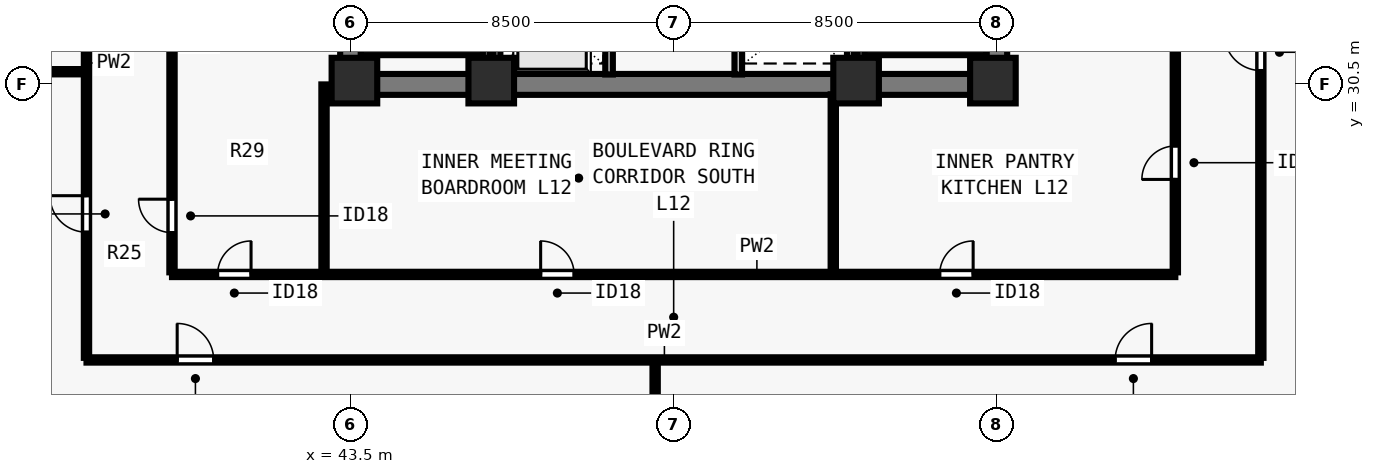
"""IFC4 building model, lengths in metres.
Left out: names, types, materials, properties, quantities, classifications, styles, units other than length and angle.
Written with IfcOpenShell. Run it as: python <this file> out.ifc"""

import sys

from ifc_helpers import new_model, si_unit, direction, frame, frame_2d, origin, origin_2d, place, context, subcontext, project, spatial, rectangle, extrude, element, fill, save


model = new_model("IFC4")
c1 = context("Model", 3, precision=1e-05, world=origin(), true_north=direction((0.0, 1.0)))
c2 = subcontext(c1, "Body", "Model", "MODEL_VIEW")
j1 = project(units=[si_unit("LENGTHUNIT", "METRE"), si_unit("PLANEANGLEUNIT", "RADIAN")], contexts=[c1])
p1 = place(None, origin())
s1 = spatial("IfcSite", under=j1, at=p1, CompositionType="ELEMENT")
p2 = place(p1, origin())
s2 = spatial("IfcBuilding", under=s1, at=p2, CompositionType="ELEMENT")
p3 = place(p2, frame((0.0, 0.0, 48.0)))
s3 = spatial("IfcBuildingStorey", under=s2, at=p3, CompositionType="ELEMENT", Elevation=48.0)
for number, where, z_axis, x_axis in (
    (1, (43.6, 30.6, 0.0), (0.0, 0.0, 1.0), (1.0, 0.0, 0.0)),
    (2, (47.2, 30.6, 0.0), (0.0, 0.0, 1.0), (1.0, 0.0, 0.0)),
    (3, (56.8, 30.6, 0.0), (0.0, 0.0, 1.0), (1.0, 0.0, 0.0)),
    (4, (60.4, 30.6, 0.0), (0.0, 0.0, 1.0), (1.0, 0.0, 0.0)),
):
    element("IfcColumn", number, at=place(p3, frame(where, z_axis=z_axis, x_axis=x_axis)), inside=s3, PredefinedType="COLUMN", context=c2, shape_type="SweptSolid", body=[
        extrude(rectangle(XDim=1.2, YDim=1.2, at=origin_2d()), origin(), (0.0, 0.0, 1.0), 3.5),
    ])
p4 = place(p3, frame((43.225, 30.5, 0.0), z_axis=(0.0, 0.0, 1.0), x_axis=(1.0, 0.0, 0.0)))
e5 = element("IfcWall", 5, at=p4, inside=s3, PredefinedType="SHEAR", context=c2, shape_type="SweptSolid", body=[
    extrude(rectangle(XDim=17.55, YDim=0.55, at=frame_2d((8.775, 0.0))), origin(), (0.0, 0.0, 1.0), 3.28),
])
for number, where, z_axis, x_axis in (
    (6, (43.5, 30.765, 0.0), (0.0, 0.0, 1.0), (0.0, 1.0, 0.0)),
    (7, (60.5, 30.765, 0.0), (0.0, 0.0, 1.0), (0.0, 1.0, 0.0)),
):
    element("IfcWall", number, at=place(p3, frame(where, z_axis=z_axis, x_axis=x_axis)), inside=s3, PredefinedType="SHEAR", context=c2, shape_type="SweptSolid", body=[
        extrude(rectangle(XDim=7.985, YDim=0.55, at=frame_2d((3.993, 0.0))), origin(), (0.0, 0.0, 1.0), 3.28),
    ])
p5 = place(p3, frame((50.3, 30.76, 0.0), z_axis=(0.0, 0.0, 1.0), x_axis=(0.0, 1.0, 0.0)))
e8 = element("IfcWall", 8, at=p5, inside=s3, PredefinedType="SOLIDWALL", context=c2, shape_type="SweptSolid", body=[
    extrude(rectangle(XDim=7.855, YDim=0.2, at=frame_2d((3.927, 0.0))), origin(), (0.0, 0.0, 1.0), 3.28),
])
p6 = place(p5, frame((0.79, 0.0, 0.0)))
e9 = element("IfcOpeningElement", 9, at=p6, cuts=e8, PredefinedType="OPENING", context=c2, shape_type="SweptSolid", body=[
    extrude(rectangle(XDim=1.1, YDim=2.2, at=frame_2d((0.55, 1.1))), frame((0.0, 0.11, 0.0), z_axis=(0.0, -1.0, 0.0), x_axis=(1.0, 0.0, 0.0)), (0.0, 0.0, 1.0), 0.22),
])
p7 = place(p5, frame((3.49, 0.0, 0.0)))
e10 = element("IfcOpeningElement", 10, at=p7, cuts=e8, PredefinedType="OPENING", context=c2, shape_type="SweptSolid", body=[
    extrude(rectangle(XDim=1.1, YDim=2.2, at=frame_2d((0.55, 1.1))), frame((0.0, 0.11, 0.0), z_axis=(0.0, -1.0, 0.0), x_axis=(1.0, 0.0, 0.0)), (0.0, 0.0, 1.0), 0.22),
])
p8 = place(p5, frame((6.19, 0.0, 0.0)))
e11 = element("IfcOpeningElement", 11, at=p8, cuts=e8, PredefinedType="OPENING", context=c2, shape_type="SweptSolid", body=[
    extrude(rectangle(XDim=1.1, YDim=2.2, at=frame_2d((0.55, 1.1))), frame((0.0, 0.11, 0.0), z_axis=(0.0, -1.0, 0.0), x_axis=(1.0, 0.0, 0.0)), (0.0, 0.0, 1.0), 0.22),
])
p9 = place(p3, frame((53.7, 30.76, 0.0), z_axis=(0.0, 0.0, 1.0), x_axis=(0.0, 1.0, 0.0)))
e12 = element("IfcWall", 12, at=p9, inside=s3, PredefinedType="SOLIDWALL", context=c2, shape_type="SweptSolid", body=[
    extrude(rectangle(XDim=7.855, YDim=0.2, at=frame_2d((3.927, 0.0))), origin(), (0.0, 0.0, 1.0), 3.28),
])
for number, where, z_axis, x_axis in (
    (13, (47.35, 30.76, 0.0), (0.0, 0.0, 1.0), (0.0, 1.0, 0.0)),
    (14, (56.65, 30.76, 0.0), (0.0, 0.0, 1.0), (0.0, 1.0, 0.0)),
):
    element("IfcWall", number, at=place(p3, frame(where, z_axis=z_axis, x_axis=x_axis)), inside=s3, PredefinedType="SOLIDWALL", context=c2, shape_type="SweptSolid", body=[
        extrude(rectangle(XDim=7.855, YDim=0.18, at=frame_2d((3.927, 0.0))), origin(), (0.0, 0.0, 1.0), 3.28),
    ])
p10 = place(p3, frame((36.55, 23.25, 0.0), z_axis=(0.0, 0.0, 1.0), x_axis=(1.0, 0.0, 0.0)))
e15 = element("IfcWall", 15, at=p10, inside=s3, PredefinedType="PARTITIONING", context=c2, shape_type="SweptSolid", body=[
    extrude(rectangle(XDim=30.9, YDim=0.14, at=frame_2d((15.45, 0.0))), origin(), (0.0, 0.0, 1.0), 3.28),
])
p11 = place(p10, frame((2.386, 0.0, 0.0)))
e16 = element("IfcOpeningElement", 16, at=p11, cuts=e15, PredefinedType="OPENING", context=c2, shape_type="SweptSolid", body=[
    extrude(rectangle(XDim=0.96, YDim=2.12, at=frame_2d((0.48, 1.06))), frame((0.0, 0.08, 0.0), z_axis=(0.0, -1.0, 0.0), x_axis=(1.0, 0.0, 0.0)), (0.0, 0.0, 1.0), 0.16),
])
p12 = place(p10, frame((27.066, 0.0, 0.0)))
e17 = element("IfcOpeningElement", 17, at=p12, cuts=e15, PredefinedType="OPENING", context=c2, shape_type="SweptSolid", body=[
    extrude(rectangle(XDim=0.96, YDim=2.12, at=frame_2d((0.48, 1.06))), frame((0.0, 0.08, 0.0), z_axis=(0.0, -1.0, 0.0), x_axis=(1.0, 0.0, 0.0)), (0.0, 0.0, 1.0), 0.16),
])
p13 = place(p3, frame((36.55, 23.305, 0.0), z_axis=(0.0, 0.0, 1.0), x_axis=(0.0, 1.0, 0.0)))
e18 = element("IfcWall", 18, at=p13, inside=s3, PredefinedType="PARTITIONING", context=c2, shape_type="SweptSolid", body=[
    extrude(rectangle(XDim=31.39, YDim=0.14, at=frame_2d((15.695, 0.0))), origin(), (0.0, 0.0, 1.0), 3.28),
])
p14 = place(p13, frame((3.307, 0.0, 0.0)))
e19 = element("IfcOpeningElement", 19, at=p14, cuts=e18, PredefinedType="OPENING", context=c2, shape_type="SweptSolid", body=[
    extrude(rectangle(XDim=0.96, YDim=2.12, at=frame_2d((0.48, 1.06))), frame((0.0, 0.08, 0.0), z_axis=(0.0, -1.0, 0.0), x_axis=(1.0, 0.0, 0.0)), (0.0, 0.0, 1.0), 0.16),
])
p15 = place(p13, frame((11.25, 0.0, 0.0)))
e20 = element("IfcOpeningElement", 20, at=p15, cuts=e18, PredefinedType="OPENING", context=c2, shape_type="SweptSolid", body=[
    extrude(rectangle(XDim=0.96, YDim=2.12, at=frame_2d((0.48, 1.06))), frame((0.0, 0.08, 0.0), z_axis=(0.0, -1.0, 0.0), x_axis=(1.0, 0.0, 0.0)), (0.0, 0.0, 1.0), 0.16),
])
p16 = place(p13, frame((19.075, 0.0, 0.0)))
e21 = element("IfcOpeningElement", 21, at=p16, cuts=e18, PredefinedType="OPENING", context=c2, shape_type="SweptSolid", body=[
    extrude(rectangle(XDim=0.96, YDim=2.12, at=frame_2d((0.48, 1.06))), frame((0.0, 0.08, 0.0), z_axis=(0.0, -1.0, 0.0), x_axis=(1.0, 0.0, 0.0)), (0.0, 0.0, 1.0), 0.16),
])
p17 = place(p13, frame((26.782, 0.0, 0.0)))
e22 = element("IfcOpeningElement", 22, at=p17, cuts=e18, PredefinedType="OPENING", context=c2, shape_type="SweptSolid", body=[
    extrude(rectangle(XDim=0.96, YDim=2.12, at=frame_2d((0.48, 1.06))), frame((0.0, 0.08, 0.0), z_axis=(0.0, -1.0, 0.0), x_axis=(1.0, 0.0, 0.0)), (0.0, 0.0, 1.0), 0.16),
])
p18 = place(p3, frame((67.45, 23.305, 0.0), z_axis=(0.0, 0.0, 1.0), x_axis=(0.0, 1.0, 0.0)))
e23 = element("IfcWall", 23, at=p18, inside=s3, PredefinedType="PARTITIONING", context=c2, shape_type="SweptSolid", body=[
    extrude(rectangle(XDim=31.39, YDim=0.14, at=frame_2d((15.695, 0.0))), origin(), (0.0, 0.0, 1.0), 3.28),
])
p19 = place(p18, frame((7.561, 0.0, 0.0)))
e24 = element("IfcOpeningElement", 24, at=p19, cuts=e23, PredefinedType="OPENING", context=c2, shape_type="SweptSolid", body=[
    extrude(rectangle(XDim=0.96, YDim=2.12, at=frame_2d((0.48, 1.06))), frame((0.0, 0.08, 0.0), z_axis=(0.0, -1.0, 0.0), x_axis=(1.0, 0.0, 0.0)), (0.0, 0.0, 1.0), 0.16),
])
p20 = place(p18, frame((23.211, 0.0, 0.0)))
e25 = element("IfcOpeningElement", 25, at=p20, cuts=e23, PredefinedType="OPENING", context=c2, shape_type="SweptSolid", body=[
    extrude(rectangle(XDim=0.96, YDim=2.12, at=frame_2d((0.48, 1.06))), frame((0.0, 0.08, 0.0), z_axis=(0.0, -1.0, 0.0), x_axis=(1.0, 0.0, 0.0)), (0.0, 0.0, 1.0), 0.16),
])
p21 = place(p3, frame((38.8, 25.5, 0.0), z_axis=(0.0, 0.0, 1.0), x_axis=(1.0, 0.0, 0.0)))
e26 = element("IfcWall", 26, at=p21, inside=s3, PredefinedType="PARTITIONING", context=c2, shape_type="SweptSolid", body=[
    extrude(rectangle(XDim=26.4, YDim=0.14, at=frame_2d((13.2, 0.0))), origin(), (0.0, 0.0, 1.0), 3.28),
])
p22 = place(p21, frame((1.2, 0.0, 0.0)))
e27 = element("IfcOpeningElement", 27, at=p22, cuts=e26, PredefinedType="OPENING", context=c2, shape_type="SweptSolid", body=[
    extrude(rectangle(XDim=0.88, YDim=2.1, at=frame_2d((0.44, 1.05))), frame((0.0, 0.08, 0.0), z_axis=(0.0, -1.0, 0.0), x_axis=(1.0, 0.0, 0.0)), (0.0, 0.0, 1.0), 0.16),
])
p23 = place(p21, frame((9.7, 0.0, 0.0)))
e28 = element("IfcOpeningElement", 28, at=p23, cuts=e26, PredefinedType="OPENING", context=c2, shape_type="SweptSolid", body=[
    extrude(rectangle(XDim=0.88, YDim=2.1, at=frame_2d((0.44, 1.05))), frame((0.0, 0.08, 0.0), z_axis=(0.0, -1.0, 0.0), x_axis=(1.0, 0.0, 0.0)), (0.0, 0.0, 1.0), 0.16),
])
p24 = place(p21, frame((20.2, 0.0, 0.0)))
e29 = element("IfcOpeningElement", 29, at=p24, cuts=e26, PredefinedType="OPENING", context=c2, shape_type="SweptSolid", body=[
    extrude(rectangle(XDim=0.88, YDim=2.1, at=frame_2d((0.44, 1.05))), frame((0.0, 0.08, 0.0), z_axis=(0.0, -1.0, 0.0), x_axis=(1.0, 0.0, 0.0)), (0.0, 0.0, 1.0), 0.16),
])
p25 = place(p3, frame((38.8, 25.555, 0.0), z_axis=(0.0, 0.0, 1.0), x_axis=(0.0, 1.0, 0.0)))
e30 = element("IfcWall", 30, at=p25, inside=s3, PredefinedType="PARTITIONING", context=c2, shape_type="SweptSolid", body=[
    extrude(rectangle(XDim=13.195, YDim=0.14, at=frame_2d((6.598, 0.0))), origin(), (0.0, 0.0, 1.0), 3.28),
])
p26 = place(p25, frame((1.045, 0.0, 0.0)))
e31 = element("IfcOpeningElement", 31, at=p26, cuts=e30, PredefinedType="OPENING", context=c2, shape_type="SweptSolid", body=[
    extrude(rectangle(XDim=0.88, YDim=2.1, at=frame_2d((0.44, 1.05))), frame((0.0, 0.08, 0.0), z_axis=(0.0, -1.0, 0.0), x_axis=(1.0, 0.0, 0.0)), (0.0, 0.0, 1.0), 0.16),
])
p27 = place(p25, frame((10.245, 0.0, 0.0)))
e32 = element("IfcOpeningElement", 32, at=p27, cuts=e30, PredefinedType="OPENING", context=c2, shape_type="SweptSolid", body=[
    extrude(rectangle(XDim=0.88, YDim=2.1, at=frame_2d((0.44, 1.05))), frame((0.0, 0.08, 0.0), z_axis=(0.0, -1.0, 0.0), x_axis=(1.0, 0.0, 0.0)), (0.0, 0.0, 1.0), 0.16),
])
p28 = place(p3, frame((65.2, 25.555, 0.0), z_axis=(0.0, 0.0, 1.0), x_axis=(0.0, 1.0, 0.0)))
e33 = element("IfcWall", 33, at=p28, inside=s3, PredefinedType="PARTITIONING", context=c2, shape_type="SweptSolid", body=[
    extrude(rectangle(XDim=13.195, YDim=0.14, at=frame_2d((6.598, 0.0))), origin(), (0.0, 0.0, 1.0), 3.28),
])
p29 = place(p28, frame((2.445, 0.0, 0.0)))
e34 = element("IfcOpeningElement", 34, at=p29, cuts=e33, PredefinedType="OPENING", context=c2, shape_type="SweptSolid", body=[
    extrude(rectangle(XDim=0.88, YDim=2.1, at=frame_2d((0.44, 1.05))), frame((0.0, 0.08, 0.0), z_axis=(0.0, -1.0, 0.0), x_axis=(1.0, 0.0, 0.0)), (0.0, 0.0, 1.0), 0.16),
])
p30 = place(p3, frame((42.8, 25.555, 0.0), z_axis=(0.0, 0.0, 1.0), x_axis=(0.0, 1.0, 0.0)))
e35 = element("IfcWall", 35, at=p30, inside=s3, PredefinedType="PARTITIONING", context=c2, shape_type="SweptSolid", body=[
    extrude(rectangle(XDim=4.945, YDim=0.14, at=frame_2d((2.473, 0.0))), origin(), (0.0, 0.0, 1.0), 2.439),
])
p31 = place(p3, frame((56.2, 25.555, 0.0), z_axis=(0.0, 0.0, 1.0), x_axis=(0.0, 1.0, 0.0)))
e36 = element("IfcWall", 36, at=p31, inside=s3, PredefinedType="PARTITIONING", context=c2, shape_type="SweptSolid", body=[
    extrude(rectangle(XDim=4.685, YDim=0.14, at=frame_2d((2.343, 0.0))), origin(), (0.0, 0.0, 1.0), 2.849),
])
p32 = place(p3, frame((51.512, 13.92, 0.0), z_axis=(0.0, 0.0, 1.0), x_axis=(0.0, 1.0, 0.0)))
e37 = element("IfcWall", 37, at=p32, inside=s3, PredefinedType="PARTITIONING", context=c2, shape_type="SweptSolid", body=[
    extrude(rectangle(XDim=9.23, YDim=0.14, at=frame_2d((4.615, 0.0))), origin(), (0.0, 0.0, 1.0), 2.849),
])
p33 = place(p3, frame((26.92, 30.834, 0.0), z_axis=(0.0, 0.0, 1.0), x_axis=(1.0, 0.0, 0.0)))
e38 = element("IfcWall", 38, at=p33, inside=s3, PredefinedType="PARTITIONING", context=c2, shape_type="SweptSolid", body=[
    extrude(rectangle(XDim=9.53, YDim=0.14, at=frame_2d((4.765, 0.0))), origin(), (0.0, 0.0, 1.0), 3.28),
])
p34 = place(p3, frame((43.765, 31.36, 0.0), z_axis=(0.0, 0.0, 1.0), x_axis=(1.0, 0.0, 0.0)))
e39 = element("IfcWall", 39, at=p34, inside=s3, PredefinedType="SOLIDWALL", context=c2, shape_type="SweptSolid", body=[
    extrude(rectangle(XDim=3.23, YDim=0.18, at=frame_2d((1.615, 0.0))), origin(), (0.0, 0.0, 1.0), 3.28),
])
p35 = place(p3, frame((47.07, 38.78, 0.0), z_axis=(0.0, 0.0, 1.0), x_axis=(0.0, -1.0, 0.0)))
e40 = element("IfcWall", 40, at=p35, inside=s3, PredefinedType="SOLIDWALL", context=c2, shape_type="SweptSolid", body=[
    extrude(rectangle(XDim=8.017, YDim=0.18, at=frame_2d((4.009, 0.0))), origin(), (0.0, 0.0, 1.0), 3.28),
])
p36 = place(p3, frame((57.005, 31.36, 0.0), z_axis=(0.0, 0.0, 1.0), x_axis=(1.0, 0.0, 0.0)))
e41 = element("IfcWall", 41, at=p36, inside=s3, PredefinedType="SOLIDWALL", context=c2, shape_type="SweptSolid", body=[
    extrude(rectangle(XDim=3.23, YDim=0.18, at=frame_2d((1.615, 0.0))), origin(), (0.0, 0.0, 1.0), 3.28),
])
p37 = place(p3, frame((56.93, 38.78, 0.0), z_axis=(0.0, 0.0, 1.0), x_axis=(0.0, -1.0, 0.0)))
e42 = element("IfcWall", 42, at=p37, inside=s3, PredefinedType="SOLIDWALL", context=c2, shape_type="SweptSolid", body=[
    extrude(rectangle(XDim=8.017, YDim=0.18, at=frame_2d((4.009, 0.0))), origin(), (0.0, 0.0, 1.0), 3.28),
])
p38 = place(p22, origin())
e43 = element("IfcDoor", 43, at=p38, inside=s3, OperationType="SINGLE_SWING_RIGHT", PredefinedType="DOOR", context=c2, shape_type="SweptSolid", body=[
    extrude(rectangle(XDim=0.88, YDim=2.1, at=frame_2d((0.44, 1.05))), frame((0.0, 0.025, 0.0), z_axis=(0.0, -1.0, 0.0), x_axis=(1.0, 0.0, 0.0)), (0.0, 0.0, 1.0), 0.05),
])
fill(e27, e43)
p39 = place(p23, origin())
e44 = element("IfcDoor", 44, at=p39, inside=s3, OperationType="SINGLE_SWING_LEFT", PredefinedType="DOOR", context=c2, shape_type="SweptSolid", body=[
    extrude(rectangle(XDim=0.88, YDim=2.1, at=frame_2d((0.44, 1.05))), frame((0.0, 0.025, 0.0), z_axis=(0.0, -1.0, 0.0), x_axis=(1.0, 0.0, 0.0)), (0.0, 0.0, 1.0), 0.05),
])
fill(e28, e44)
p40 = place(p24, origin())
e45 = element("IfcDoor", 45, at=p40, inside=s3, OperationType="SINGLE_SWING_RIGHT", PredefinedType="DOOR", context=c2, shape_type="SweptSolid", body=[
    extrude(rectangle(XDim=0.88, YDim=2.1, at=frame_2d((0.44, 1.05))), frame((0.0, 0.025, 0.0), z_axis=(0.0, -1.0, 0.0), x_axis=(1.0, 0.0, 0.0)), (0.0, 0.0, 1.0), 0.05),
])
fill(e29, e45)
p41 = place(p26, origin())
e46 = element("IfcDoor", 46, at=p41, inside=s3, OperationType="SINGLE_SWING_RIGHT", PredefinedType="DOOR", context=c2, shape_type="SweptSolid", body=[
    extrude(rectangle(XDim=0.88, YDim=2.1, at=frame_2d((0.44, 1.05))), frame((0.0, 0.025, 0.0), z_axis=(0.0, -1.0, 0.0), x_axis=(1.0, 0.0, 0.0)), (0.0, 0.0, 1.0), 0.05),
])
fill(e31, e46)
p42 = place(p29, origin())
e47 = element("IfcDoor", 47, at=p42, inside=s3, OperationType="SINGLE_SWING_LEFT", PredefinedType="DOOR", context=c2, shape_type="SweptSolid", body=[
    extrude(rectangle(XDim=0.88, YDim=2.1, at=frame_2d((0.44, 1.05))), frame((0.0, 0.025, 0.0), z_axis=(0.0, -1.0, 0.0), x_axis=(1.0, 0.0, 0.0)), (0.0, 0.0, 1.0), 0.05),
])
fill(e34, e47)
p43 = place(p11, origin())
e48 = element("IfcDoor", 48, at=p43, inside=s3, OperationType="SINGLE_SWING_LEFT", PredefinedType="DOOR", context=c2, shape_type="SweptSolid", body=[
    extrude(rectangle(XDim=0.96, YDim=2.12, at=frame_2d((0.48, 1.06))), frame((0.0, 0.025, 0.0), z_axis=(0.0, -1.0, 0.0), x_axis=(1.0, 0.0, 0.0)), (0.0, 0.0, 1.0), 0.05),
])
fill(e16, e48)
p44 = place(p12, origin())
e49 = element("IfcDoor", 49, at=p44, inside=s3, OperationType="SINGLE_SWING_RIGHT", PredefinedType="DOOR", context=c2, shape_type="SweptSolid", body=[
    extrude(rectangle(XDim=0.96, YDim=2.12, at=frame_2d((0.48, 1.06))), frame((0.0, 0.025, 0.0), z_axis=(0.0, -1.0, 0.0), x_axis=(1.0, 0.0, 0.0)), (0.0, 0.0, 1.0), 0.05),
])
fill(e17, e49)
p45 = place(p14, origin())
e50 = element("IfcDoor", 50, at=p45, inside=s3, OperationType="SINGLE_SWING_RIGHT", PredefinedType="DOOR", context=c2, shape_type="SweptSolid", body=[
    extrude(rectangle(XDim=0.96, YDim=2.12, at=frame_2d((0.48, 1.06))), frame((0.0, 0.025, 0.0), z_axis=(0.0, -1.0, 0.0), x_axis=(1.0, 0.0, 0.0)), (0.0, 0.0, 1.0), 0.05),
])
fill(e19, e50)
p46 = place(p19, origin())
e51 = element("IfcDoor", 51, at=p46, inside=s3, OperationType="SINGLE_SWING_RIGHT", PredefinedType="DOOR", context=c2, shape_type="SweptSolid", body=[
    extrude(rectangle(XDim=0.96, YDim=2.12, at=frame_2d((0.48, 1.06))), frame((0.0, 0.025, 0.0), z_axis=(0.0, -1.0, 0.0), x_axis=(1.0, 0.0, 0.0)), (0.0, 0.0, 1.0), 0.05),
])
fill(e24, e51)
save(model, sys.argv[1])
